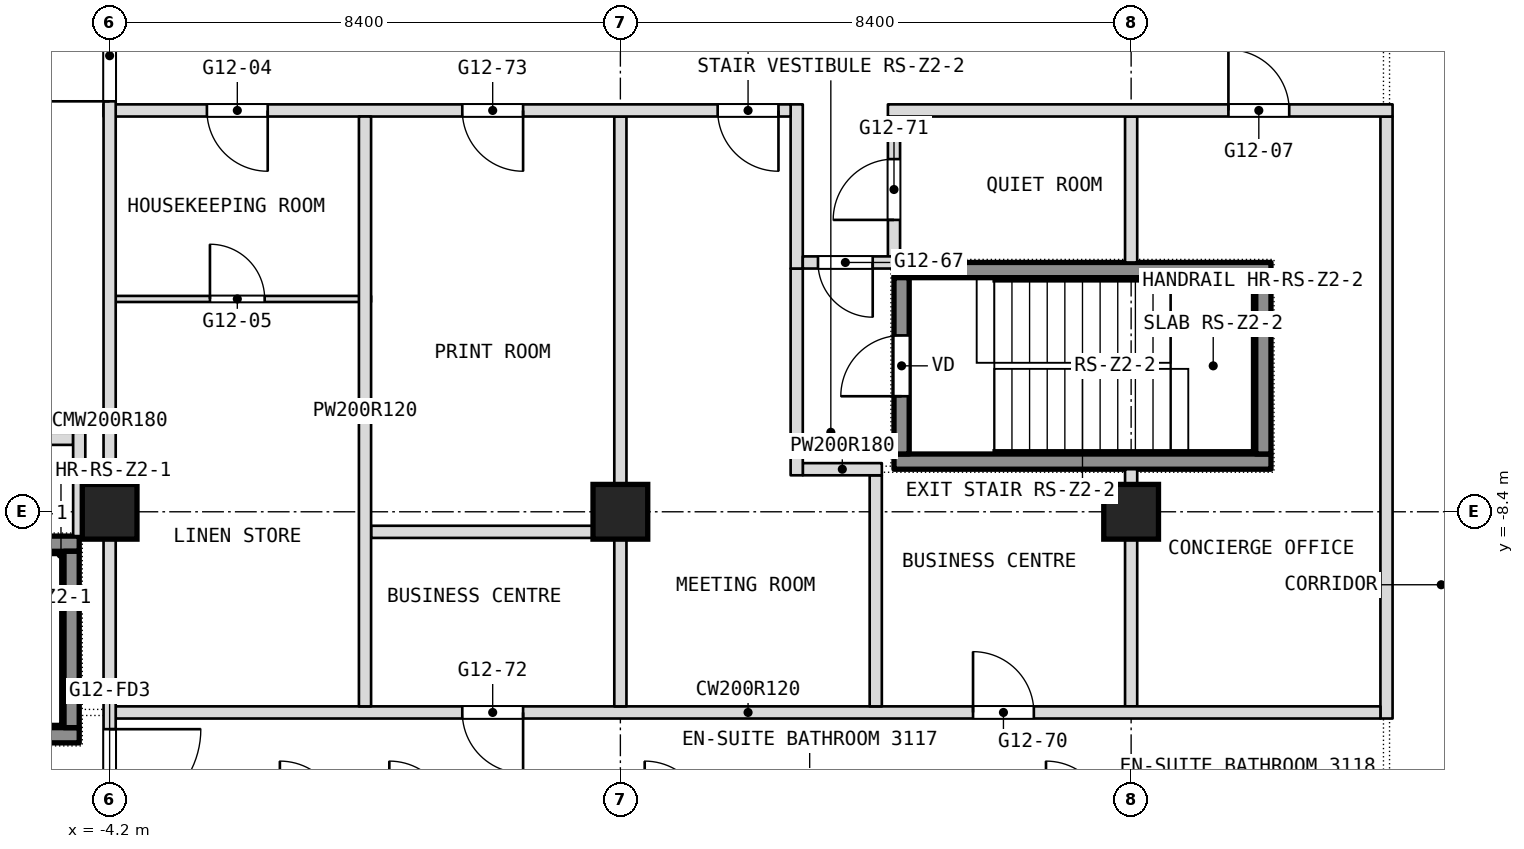
"""IFC4 building model, lengths in metres.
Left out: names, types, materials, properties, quantities, classifications, styles, units other than length and angle.
Written with IfcOpenShell. Run it as: python <this file> out.ifc"""

import sys

from ifc_helpers import new_model, si_unit, direction, frame, frame_2d, origin, origin_2d, place, context, subcontext, project, spatial, rectangle, extrude, element, fill, save


model = new_model("IFC4")
c1 = context("Model", 3, precision=1e-05, world=origin(), true_north=direction((0.0, 1.0)))
c2 = subcontext(c1, "Body", "Model", "MODEL_VIEW")
j1 = project(units=[si_unit("LENGTHUNIT", "METRE"), si_unit("PLANEANGLEUNIT", "RADIAN")], contexts=[c1])
p1 = place(None, origin())
s1 = spatial("IfcSite", under=j1, at=p1, CompositionType="ELEMENT")
p2 = place(p1, origin())
s2 = spatial("IfcBuilding", under=s1, at=p2, CompositionType="ELEMENT")
p3 = place(p2, frame((0.0, 0.0, 137.3)))
s3 = spatial("IfcBuildingStorey", under=s2, at=p3, CompositionType="ELEMENT", Elevation=137.3)
for number, where, z_axis, x_axis in (
    (1, (-4.2, -8.4, 0.0), (0.0, 0.0, 1.0), (1.0, 0.0, 0.0)),
    (2, (4.2, -8.4, 0.0), (0.0, 0.0, 1.0), (1.0, 0.0, 0.0)),
    (3, (12.6, -8.4, 0.0), (0.0, 0.0, 1.0), (1.0, 0.0, 0.0)),
):
    element("IfcColumn", number, at=place(p3, frame(where, z_axis=z_axis, x_axis=x_axis)), inside=s3, PredefinedType="COLUMN", context=c2, shape_type="SweptSolid", body=[
        extrude(rectangle(XDim=0.9, YDim=0.9, at=origin_2d()), origin(), (0.0, 0.0, 1.0), 3.6),
    ])
p4 = place(p3, frame((16.8, -11.8, 0.0), z_axis=(0.0, 0.0, 1.0), x_axis=(0.0, 1.0, 0.0)))
e4 = element("IfcWall", 4, at=p4, inside=s3, PredefinedType="PARTITIONING", context=c2, shape_type="SweptSolid", body=[
    extrude(rectangle(XDim=9.9, YDim=0.2, at=frame_2d((4.95, 0.0))), origin(), (0.0, 0.0, 1.0), 3.34),
])
p5 = place(p3, frame((12.6, -11.6, 0.0), z_axis=(0.0, 0.0, 1.0), x_axis=(0.0, 1.0, 0.0)))
e5 = element("IfcWall", 5, at=p5, inside=s3, PredefinedType="PARTITIONING", context=c2, shape_type="SweptSolid", body=[
    extrude(rectangle(XDim=3.9, YDim=0.2, at=frame_2d((1.95, 0.0))), origin(), (0.0, 0.0, 1.0), 3.34),
])
p6 = place(p3, frame((12.6, -4.3, 0.0), z_axis=(0.0, 0.0, 1.0), x_axis=(0.0, 1.0, 0.0)))
e6 = element("IfcWall", 6, at=p6, inside=s3, PredefinedType="PARTITIONING", context=c2, shape_type="SweptSolid", body=[
    extrude(rectangle(XDim=2.4, YDim=0.2, at=frame_2d((1.2, 0.0))), origin(), (0.0, 0.0, 1.0), 3.34),
])
p7 = place(p3, frame((-4.1, -11.7, 0.0), z_axis=(0.0, 0.0, 1.0), x_axis=(1.0, 0.0, 0.0)))
e7 = element("IfcWall", 7, at=p7, inside=s3, PredefinedType="PARTITIONING", context=c2, shape_type="SweptSolid", body=[
    extrude(rectangle(XDim=20.8, YDim=0.2, at=frame_2d((10.4, 0.0))), origin(), (0.0, 0.0, 1.0), 3.34),
])
p8 = place(p7, frame((14.1, 0.0, 0.0)))
e8 = element("IfcOpeningElement", 8, at=p8, cuts=e7, PredefinedType="OPENING", context=c2, shape_type="SweptSolid", body=[
    extrude(rectangle(XDim=1.0, YDim=2.1, at=frame_2d((0.5, 1.05))), frame((0.0, 0.1, 0.0), z_axis=(0.0, -1.0, 0.0), x_axis=(1.0, 0.0, 0.0)), (0.0, 0.0, 1.0), 0.2),
])
p9 = place(p7, frame((5.7, 0.0, 0.0)))
e9 = element("IfcOpeningElement", 9, at=p9, cuts=e7, PredefinedType="OPENING", context=c2, shape_type="SweptSolid", body=[
    extrude(rectangle(XDim=1.0, YDim=2.1, at=frame_2d((0.5, 1.05))), frame((0.0, 0.1, 0.0), z_axis=(0.0, -1.0, 0.0), x_axis=(1.0, 0.0, 0.0)), (0.0, 0.0, 1.0), 0.2),
])
p10 = place(p3, frame((0.1, -8.73, 0.0), z_axis=(0.0, 0.0, 1.0), x_axis=(1.0, 0.0, 0.0)))
e10 = element("IfcWall", 10, at=p10, inside=s3, PredefinedType="PARTITIONING", context=c2, shape_type="SweptSolid", body=[
    extrude(rectangle(XDim=4.0, YDim=0.2, at=frame_2d((2.0, 0.0))), origin(), (0.0, 0.0, 1.0), 3.34),
])
p11 = place(p3, frame((8.7, -4.3, 0.0), z_axis=(0.0, 0.0, 1.0), x_axis=(0.0, 1.0, 0.0)))
e11 = element("IfcWall", 11, at=p11, inside=s3, PredefinedType="PARTITIONING", context=c2, shape_type="SweptSolid", body=[
    extrude(rectangle(XDim=2.4, YDim=0.2, at=frame_2d((1.2, 0.0))), origin(), (0.0, 0.0, 1.0), 3.34),
])
p12 = place(p11, frame((0.7, 0.0, 0.0)))
e12 = element("IfcOpeningElement", 12, at=p12, cuts=e11, PredefinedType="OPENING", context=c2, shape_type="SweptSolid", body=[
    extrude(rectangle(XDim=1.0, YDim=2.1, at=frame_2d((0.5, 1.05))), frame((0.0, 0.1, 0.0), z_axis=(0.0, -1.0, 0.0), x_axis=(1.0, 0.0, 0.0)), (0.0, 0.0, 1.0), 0.2),
])
p13 = place(p3, frame((8.4, -11.6, 0.0), z_axis=(0.0, 0.0, 1.0), x_axis=(0.0, 1.0, 0.0)))
e13 = element("IfcWall", 13, at=p13, inside=s3, PredefinedType="PARTITIONING", context=c2, shape_type="SweptSolid", body=[
    extrude(rectangle(XDim=3.8, YDim=0.2, at=frame_2d((1.9, 0.0))), origin(), (0.0, 0.0, 1.0), 3.34),
])
p14 = place(p3, frame((7.2, -7.7, 0.0), z_axis=(0.0, 0.0, 1.0), x_axis=(1.0, 0.0, 0.0)))
e14 = element("IfcWall", 14, at=p14, inside=s3, PredefinedType="PARTITIONING", context=c2, shape_type="SweptSolid", body=[
    extrude(rectangle(XDim=1.3, YDim=0.2, at=frame_2d((0.65, 0.0))), origin(), (0.0, 0.0, 1.0), 3.34),
])
p15 = place(p3, frame((-8.5, -7.2, 0.0), z_axis=(0.0, 0.0, 1.0), x_axis=(1.0, 0.0, 0.0)))
e15 = element("IfcWall", 15, at=p15, inside=s3, PredefinedType="PARTITIONING", context=c2, shape_type="SweptSolid", body=[
    extrude(rectangle(XDim=3.7, YDim=0.2, at=frame_2d((1.85, 0.0))), origin(), (0.0, 0.0, 1.0), 3.34),
])
p16 = place(p15, frame((0.25, 0.0, 0.0)))
e16 = element("IfcOpeningElement", 16, at=p16, cuts=e15, PredefinedType="OPENING", context=c2, shape_type="SweptSolid", body=[
    extrude(rectangle(XDim=0.9, YDim=2.1, at=frame_2d((0.45, 1.05))), frame((0.0, 0.1, 0.0), z_axis=(0.0, -1.0, 0.0), x_axis=(1.0, 0.0, 0.0)), (0.0, 0.0, 1.0), 0.2),
])
p17 = place(p3, frame((7.1, -7.8, 0.0), z_axis=(0.0, 0.0, 1.0), x_axis=(0.0, 1.0, 0.0)))
e17 = element("IfcWall", 17, at=p17, inside=s3, PredefinedType="PARTITIONING", context=c2, shape_type="SweptSolid", body=[
    extrude(rectangle(XDim=3.4, YDim=0.2, at=frame_2d((1.7, 0.0))), origin(), (0.0, 0.0, 1.0), 3.34),
])
p18 = place(p3, frame((7.1, -4.4, 0.0), z_axis=(0.0, 0.0, 1.0), x_axis=(0.0, 1.0, 0.0)))
e18 = element("IfcWall", 18, at=p18, inside=s3, PredefinedType="PARTITIONING", context=c2, shape_type="SweptSolid", body=[
    extrude(rectangle(XDim=2.7, YDim=0.2, at=frame_2d((1.35, 0.0))), origin(), (0.0, 0.0, 1.0), 3.34),
])
p19 = place(p3, frame((-4.1, -4.9, 0.0), z_axis=(0.0, 0.0, 1.0), x_axis=(1.0, 0.0, 0.0)))
e19 = element("IfcWall", 19, at=p19, inside=s3, PredefinedType="PARTITIONING", context=c2, shape_type="SweptSolid", body=[
    extrude(rectangle(XDim=4.2, YDim=0.1, at=frame_2d((2.1, 0.0))), origin(), (0.0, 0.0, 1.0), 3.34),
])
p20 = place(p19, frame((1.55, 0.0, 0.0)))
e20 = element("IfcOpeningElement", 20, at=p20, cuts=e19, PredefinedType="OPENING", context=c2, shape_type="SweptSolid", body=[
    extrude(rectangle(XDim=0.9, YDim=2.1, at=frame_2d((0.45, 1.05))), frame((0.0, 0.05, 0.0), z_axis=(0.0, -1.0, 0.0), x_axis=(1.0, 0.0, 0.0)), (0.0, 0.0, 1.0), 0.1),
])
p21 = place(p3, frame((7.2, -4.3, 0.0), z_axis=(0.0, 0.0, 1.0), x_axis=(1.0, 0.0, 0.0)))
e21 = element("IfcWall", 21, at=p21, inside=s3, PredefinedType="PARTITIONING", context=c2, shape_type="SweptSolid", body=[
    extrude(rectangle(XDim=1.5, YDim=0.2, at=frame_2d((0.75, 0.0))), origin(), (0.0, 0.0, 1.0), 3.34),
])
p22 = place(p21, frame((0.25, 0.0, 0.0)))
e22 = element("IfcOpeningElement", 22, at=p22, cuts=e21, PredefinedType="OPENING", context=c2, shape_type="SweptSolid", body=[
    extrude(rectangle(XDim=0.9, YDim=2.1, at=frame_2d((0.45, 1.05))), frame((0.0, 0.1, 0.0), z_axis=(0.0, -1.0, 0.0), x_axis=(1.0, 0.0, 0.0)), (0.0, 0.0, 1.0), 0.2),
])
p23 = place(p3, frame((4.2, -11.6, 0.0), z_axis=(0.0, 0.0, 1.0), x_axis=(0.0, 1.0, 0.0)))
e23 = element("IfcWall", 23, at=p23, inside=s3, PredefinedType="PARTITIONING", context=c2, shape_type="SweptSolid", body=[
    extrude(rectangle(XDim=9.7, YDim=0.2, at=frame_2d((4.85, 0.0))), origin(), (0.0, 0.0, 1.0), 3.34),
])
p24 = place(p3, frame((-4.3, -1.8, 0.0), z_axis=(0.0, 0.0, 1.0), x_axis=(1.0, 0.0, 0.0)))
e24 = element("IfcWall", 24, at=p24, inside=s3, PredefinedType="PARTITIONING", context=c2, shape_type="SweptSolid", body=[
    extrude(rectangle(XDim=11.3, YDim=0.2, at=frame_2d((5.65, 0.0))), origin(), (0.0, 0.0, 1.0), 3.34),
])
p25 = place(p24, frame((1.7, 0.0, 0.0)))
e25 = element("IfcOpeningElement", 25, at=p25, cuts=e24, PredefinedType="OPENING", context=c2, shape_type="SweptSolid", body=[
    extrude(rectangle(XDim=1.0, YDim=2.1, at=frame_2d((0.5, 1.05))), frame((0.0, 0.1, 0.0), z_axis=(0.0, -1.0, 0.0), x_axis=(1.0, 0.0, 0.0)), (0.0, 0.0, 1.0), 0.2),
])
p26 = place(p24, frame((10.1, 0.0, 0.0)))
e26 = element("IfcOpeningElement", 26, at=p26, cuts=e24, PredefinedType="OPENING", context=c2, shape_type="SweptSolid", body=[
    extrude(rectangle(XDim=1.0, YDim=2.1, at=frame_2d((0.5, 1.05))), frame((0.0, 0.1, 0.0), z_axis=(0.0, -1.0, 0.0), x_axis=(1.0, 0.0, 0.0)), (0.0, 0.0, 1.0), 0.2),
])
p27 = place(p24, frame((5.9, 0.0, 0.0)))
e27 = element("IfcOpeningElement", 27, at=p27, cuts=e24, PredefinedType="OPENING", context=c2, shape_type="SweptSolid", body=[
    extrude(rectangle(XDim=1.0, YDim=2.1, at=frame_2d((0.5, 1.05))), frame((0.0, 0.1, 0.0), z_axis=(0.0, -1.0, 0.0), x_axis=(1.0, 0.0, 0.0)), (0.0, 0.0, 1.0), 0.2),
])
p28 = place(p3, frame((8.6, -1.8, 0.0), z_axis=(0.0, 0.0, 1.0), x_axis=(1.0, 0.0, 0.0)))
e28 = element("IfcWall", 28, at=p28, inside=s3, PredefinedType="PARTITIONING", context=c2, shape_type="SweptSolid", body=[
    extrude(rectangle(XDim=8.3, YDim=0.2, at=frame_2d((4.15, 0.0))), origin(), (0.0, 0.0, 1.0), 3.34),
])
p29 = place(p28, frame((5.6, 0.0, 0.0)))
e29 = element("IfcOpeningElement", 29, at=p29, cuts=e28, PredefinedType="OPENING", context=c2, shape_type="SweptSolid", body=[
    extrude(rectangle(XDim=1.0, YDim=2.1, at=frame_2d((0.5, 1.05))), frame((0.0, 0.1, 0.0), z_axis=(0.0, -1.0, 0.0), x_axis=(1.0, 0.0, 0.0)), (0.0, 0.0, 1.0), 0.2),
])
p30 = place(p3, frame((0.0, -11.6, 0.0), z_axis=(0.0, 0.0, 1.0), x_axis=(0.0, 1.0, 0.0)))
e30 = element("IfcWall", 30, at=p30, inside=s3, PredefinedType="PARTITIONING", context=c2, shape_type="SweptSolid", body=[
    extrude(rectangle(XDim=9.7, YDim=0.2, at=frame_2d((4.85, 0.0))), origin(), (0.0, 0.0, 1.0), 3.34),
])
p31 = place(p3, frame((-4.2, -13.8, 0.0), z_axis=(0.0, 0.0, 1.0), x_axis=(0.0, 1.0, 0.0)))
e31 = element("IfcWall", 31, at=p31, inside=s3, PredefinedType="PARTITIONING", context=c2, shape_type="SweptSolid", body=[
    extrude(rectangle(XDim=13.8, YDim=0.2, at=frame_2d((6.9, 0.0))), origin(), (0.0, 0.0, 1.0), 3.34),
])
p32 = place(p31, frame((12.15, 0.0, 0.0)))
e32 = element("IfcOpeningElement", 32, at=p32, cuts=e31, PredefinedType="OPENING", context=c2, shape_type="SweptSolid", body=[
    extrude(rectangle(XDim=1.5, YDim=2.1, at=frame_2d((0.75, 1.05))), frame((0.0, 0.1, 0.0), z_axis=(0.0, -1.0, 0.0), x_axis=(1.0, 0.0, 0.0)), (0.0, 0.0, 1.0), 0.2),
])
p33 = place(p31, frame((0.325, 0.0, 0.0)))
e33 = element("IfcOpeningElement", 33, at=p33, cuts=e31, PredefinedType="OPENING", context=c2, shape_type="SweptSolid", body=[
    extrude(rectangle(XDim=1.5, YDim=2.1, at=frame_2d((0.75, 1.05))), frame((0.0, 0.1, 0.0), z_axis=(0.0, -1.0, 0.0), x_axis=(1.0, 0.0, 0.0)), (0.0, 0.0, 1.0), 0.2),
])
p34 = place(p3, frame((-4.7, -8.8, 0.0), z_axis=(0.0, 0.0, 1.0), x_axis=(0.0, 1.0, 0.0)))
e34 = element("IfcWall", 34, at=p34, inside=s3, PredefinedType="PARTITIONING", context=c2, shape_type="SweptSolid", body=[
    extrude(rectangle(XDim=1.7, YDim=0.2, at=frame_2d((0.85, 0.0))), origin(), (0.0, 0.0, 1.0), 3.34),
])
p35 = place(p3, frame((-10.9, -12.075, 0.1), z_axis=(0.0, 0.0, 1.0), x_axis=(1.0, 0.0, 0.0)))
e35 = element("IfcWall", 35, at=p35, inside=s3, PredefinedType="SHEAR", context=c2, shape_type="SweptSolid", body=[
    extrude(rectangle(XDim=6.2, YDim=0.25, at=frame_2d((3.1, 0.0))), origin(), (0.0, 0.0, 1.0), 3.6),
])
p36 = place(p3, frame((-10.9, -8.925, 0.1), z_axis=(0.0, 0.0, 1.0), x_axis=(1.0, 0.0, 0.0)))
e36 = element("IfcWall", 36, at=p36, inside=s3, PredefinedType="SHEAR", context=c2, shape_type="SweptSolid", body=[
    extrude(rectangle(XDim=6.2, YDim=0.25, at=frame_2d((3.1, 0.0))), origin(), (0.0, 0.0, 1.0), 3.6),
])
p37 = place(p36, frame((0.45, 0.0, 0.0)))
e37 = element("IfcOpeningElement", 37, at=p37, cuts=e36, PredefinedType="OPENING", context=c2, shape_type="SweptSolid", body=[
    extrude(rectangle(XDim=1.0, YDim=2.1, at=frame_2d((0.5, 1.05))), frame((0.0, 0.125, 0.0), z_axis=(0.0, -1.0, 0.0), x_axis=(1.0, 0.0, 0.0)), (0.0, 0.0, 1.0), 0.25),
])
p38 = place(p3, frame((-4.825, -11.95, 0.1), z_axis=(0.0, 0.0, 1.0), x_axis=(0.0, 1.0, 0.0)))
e38 = element("IfcWall", 38, at=p38, inside=s3, PredefinedType="SHEAR", context=c2, shape_type="SweptSolid", body=[
    extrude(rectangle(XDim=2.9, YDim=0.25, at=frame_2d((1.45, 0.0))), origin(), (0.0, 0.0, 1.0), 3.6),
])
for number, where, z_axis, x_axis in (
    (39, (8.7, -7.575, 0.1), (0.0, 0.0, 1.0), (1.0, 0.0, 0.0)),
    (40, (8.7, -4.425, 0.1), (0.0, 0.0, 1.0), (1.0, 0.0, 0.0)),
):
    element("IfcWall", number, at=place(p3, frame(where, z_axis=z_axis, x_axis=x_axis)), inside=s3, PredefinedType="SHEAR", context=c2, shape_type="SweptSolid", body=[
        extrude(rectangle(XDim=6.2, YDim=0.25, at=frame_2d((3.1, 0.0))), origin(), (0.0, 0.0, 1.0), 3.6),
    ])
p39 = place(p3, frame((8.825, -7.45, 0.1), z_axis=(0.0, 0.0, 1.0), x_axis=(0.0, 1.0, 0.0)))
e41 = element("IfcWall", 41, at=p39, inside=s3, PredefinedType="SHEAR", context=c2, shape_type="SweptSolid", body=[
    extrude(rectangle(XDim=2.9, YDim=0.25, at=frame_2d((1.45, 0.0))), origin(), (0.0, 0.0, 1.0), 3.6),
])
p40 = place(p39, frame((0.95, 0.0, 0.0)))
e42 = element("IfcOpeningElement", 42, at=p40, cuts=e41, PredefinedType="OPENING", context=c2, shape_type="SweptSolid", body=[
    extrude(rectangle(XDim=1.0, YDim=2.1, at=frame_2d((0.5, 1.05))), frame((0.0, 0.125, 0.0), z_axis=(0.0, -1.0, 0.0), x_axis=(1.0, 0.0, 0.0)), (0.0, 0.0, 1.0), 0.25),
])
p41 = place(p3, frame((14.775, -7.45, 0.1), z_axis=(0.0, 0.0, 1.0), x_axis=(0.0, 1.0, 0.0)))
e43 = element("IfcWall", 43, at=p41, inside=s3, PredefinedType="SHEAR", context=c2, shape_type="SweptSolid", body=[
    extrude(rectangle(XDim=2.9, YDim=0.25, at=frame_2d((1.45, 0.0))), origin(), (0.0, 0.0, 1.0), 3.6),
])
p42 = place(p8, origin())
e44 = element("IfcDoor", 44, at=p42, inside=s3, OperationType="SINGLE_SWING_RIGHT", PredefinedType="DOOR", context=c2, shape_type="SweptSolid", body=[
    extrude(rectangle(XDim=1.0, YDim=2.1, at=frame_2d((0.5, 1.05))), frame((0.0, 0.025, 0.0), z_axis=(0.0, -1.0, 0.0), x_axis=(1.0, 0.0, 0.0)), (0.0, 0.0, 1.0), 0.05),
])
fill(e8, e44)
p43 = place(p9, origin())
e45 = element("IfcDoor", 45, at=p43, inside=s3, OperationType="SINGLE_SWING_RIGHT", PredefinedType="DOOR", context=c2, shape_type="SweptSolid", body=[
    extrude(rectangle(XDim=1.0, YDim=2.1, at=frame_2d((0.5, 1.05))), frame((0.0, 0.025, 0.0), z_axis=(0.0, -1.0, 0.0), x_axis=(1.0, 0.0, 0.0)), (0.0, 0.0, 1.0), 0.05),
])
fill(e9, e45)
p44 = place(p12, origin())
e46 = element("IfcDoor", 46, at=p44, inside=s3, OperationType="SINGLE_SWING_LEFT", PredefinedType="DOOR", context=c2, shape_type="SweptSolid", body=[
    extrude(rectangle(XDim=1.0, YDim=2.1, at=frame_2d((0.5, 1.05))), frame((0.0, 0.025, 0.0), z_axis=(0.0, -1.0, 0.0), x_axis=(1.0, 0.0, 0.0)), (0.0, 0.0, 1.0), 0.05),
])
fill(e12, e46)
p45 = place(p20, origin())
e47 = element("IfcDoor", 47, at=p45, inside=s3, OperationType="SINGLE_SWING_LEFT", PredefinedType="DOOR", context=c2, shape_type="SweptSolid", body=[
    extrude(rectangle(XDim=0.9, YDim=2.1, at=frame_2d((0.45, 1.05))), frame((0.0, 0.025, 0.0), z_axis=(0.0, -1.0, 0.0), x_axis=(1.0, 0.0, 0.0)), (0.0, 0.0, 1.0), 0.05),
])
fill(e20, e47)
p46 = place(p22, origin())
e48 = element("IfcDoor", 48, at=p46, inside=s3, OperationType="SINGLE_SWING_LEFT", PredefinedType="DOOR", context=c2, shape_type="SweptSolid", body=[
    extrude(rectangle(XDim=0.9, YDim=2.1, at=frame_2d((0.45, 1.05))), frame((0.0, 0.025, 0.0), z_axis=(0.0, -1.0, 0.0), x_axis=(1.0, 0.0, 0.0)), (0.0, 0.0, 1.0), 0.05),
])
fill(e22, e48)
p47 = place(p25, origin())
e49 = element("IfcDoor", 49, at=p47, inside=s3, OperationType="SINGLE_SWING_RIGHT", PredefinedType="DOOR", context=c2, shape_type="SweptSolid", body=[
    extrude(rectangle(XDim=1.0, YDim=2.1, at=frame_2d((0.5, 1.05))), frame((0.0, 0.025, 0.0), z_axis=(0.0, -1.0, 0.0), x_axis=(1.0, 0.0, 0.0)), (0.0, 0.0, 1.0), 0.05),
])
fill(e25, e49)
p48 = place(p26, origin())
e50 = element("IfcDoor", 50, at=p48, inside=s3, OperationType="SINGLE_SWING_LEFT", PredefinedType="DOOR", context=c2, shape_type="SweptSolid", body=[
    extrude(rectangle(XDim=1.0, YDim=2.1, at=frame_2d((0.5, 1.05))), frame((0.0, 0.025, 0.0), z_axis=(0.0, -1.0, 0.0), x_axis=(1.0, 0.0, 0.0)), (0.0, 0.0, 1.0), 0.05),
])
fill(e26, e50)
p49 = place(p27, origin())
e51 = element("IfcDoor", 51, at=p49, inside=s3, OperationType="SINGLE_SWING_LEFT", PredefinedType="DOOR", context=c2, shape_type="SweptSolid", body=[
    extrude(rectangle(XDim=1.0, YDim=2.1, at=frame_2d((0.5, 1.05))), frame((0.0, 0.025, 0.0), z_axis=(0.0, -1.0, 0.0), x_axis=(1.0, 0.0, 0.0)), (0.0, 0.0, 1.0), 0.05),
])
fill(e27, e51)
p50 = place(p29, origin())
e52 = element("IfcDoor", 52, at=p50, inside=s3, OperationType="SINGLE_SWING_LEFT", PredefinedType="DOOR", context=c2, shape_type="SweptSolid", body=[
    extrude(rectangle(XDim=1.0, YDim=2.1, at=frame_2d((0.5, 1.05))), frame((0.0, 0.025, 0.0), z_axis=(0.0, -1.0, 0.0), x_axis=(1.0, 0.0, 0.0)), (0.0, 0.0, 1.0), 0.05),
])
fill(e29, e52)
p51 = place(p40, origin())
e53 = element("IfcDoor", 53, at=p51, inside=s3, OperationType="SINGLE_SWING_LEFT", PredefinedType="DOOR", context=c2, shape_type="SweptSolid", body=[
    extrude(rectangle(XDim=1.0, YDim=2.1, at=frame_2d((0.5, 1.05))), frame((0.0, 0.025, 0.0), z_axis=(0.0, -1.0, 0.0), x_axis=(1.0, 0.0, 0.0)), (0.0, 0.0, 1.0), 0.05),
])
fill(e42, e53)
p52 = place(p32, origin())
e54 = element("IfcDoor", 54, at=p52, inside=s3, OperationType="DOUBLE_DOOR_DOUBLE_SWING", PredefinedType="DOOR", context=c2, shape_type="SweptSolid", body=[
    extrude(rectangle(XDim=1.5, YDim=2.1, at=frame_2d((0.75, 1.05))), frame((0.0, 0.025, 0.0), z_axis=(0.0, -1.0, 0.0), x_axis=(1.0, 0.0, 0.0)), (0.0, 0.0, 1.0), 0.05),
])
fill(e32, e54)
p53 = place(p33, origin())
e55 = element("IfcDoor", 55, at=p53, inside=s3, OperationType="DOUBLE_DOOR_DOUBLE_SWING", PredefinedType="DOOR", context=c2, shape_type="SweptSolid", body=[
    extrude(rectangle(XDim=1.5, YDim=2.1, at=frame_2d((0.75, 1.05))), frame((0.0, 0.025, 0.0), z_axis=(0.0, -1.0, 0.0), x_axis=(1.0, 0.0, 0.0)), (0.0, 0.0, 1.0), 0.05),
])
fill(e33, e55)
save(model, sys.argv[1])
